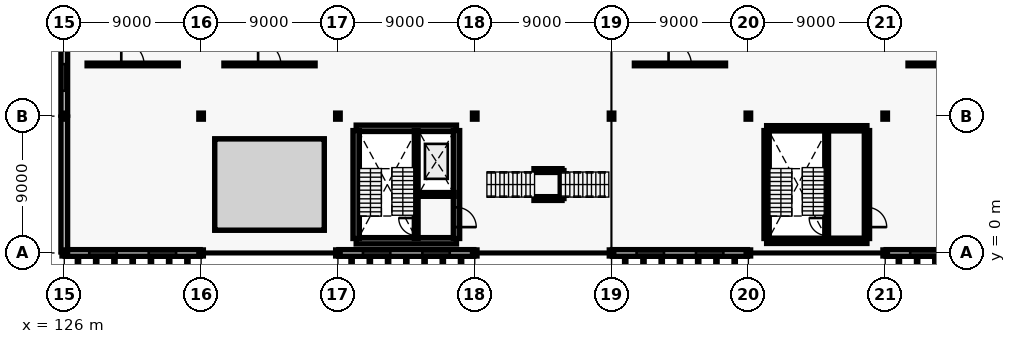
"""IFC4 building model, lengths in metres.
Left out: names, types, materials, properties, quantities, classifications, styles, units other than length and angle.
Written with IfcOpenShell. Run it as: python <this file> out.ifc"""

import sys

from ifc_helpers import new_model, si_unit, direction, frame, frame_2d, origin, origin_2d, place, context, subcontext, project, spatial, rectangle, i_section, extrude, element, fill, save


model = new_model("IFC4")
c1 = context("Model", 3, precision=1e-05, world=origin(), true_north=direction((0.0, 1.0)))
c2 = subcontext(c1, "Body", "Model", "MODEL_VIEW")
j1 = project(units=[si_unit("LENGTHUNIT", "METRE"), si_unit("PLANEANGLEUNIT", "RADIAN")], contexts=[c1])
p1 = place(None, origin())
s1 = spatial("IfcSite", under=j1, at=p1, CompositionType="ELEMENT")
p2 = place(p1, origin())
s2 = spatial("IfcBuilding", under=s1, at=p2, CompositionType="ELEMENT")
p3 = place(p2, frame((0.0, 0.0, 5.4)))
s3 = spatial("IfcBuildingStorey", under=s2, at=p3, CompositionType="ELEMENT", Elevation=5.4)
for number, where, z_axis, x_axis in (
    (1, (126.0, 0.0, 0.0), (0.0, 0.0, 1.0), (1.0, 0.0, 0.0)),
    (2, (126.0, 9.0, 0.0), (0.0, 0.0, 1.0), (1.0, 0.0, 0.0)),
    (3, (135.0, 0.0, 0.0), (0.0, 0.0, 1.0), (1.0, 0.0, 0.0)),
    (4, (135.0, 9.0, 0.0), (0.0, 0.0, 1.0), (1.0, 0.0, 0.0)),
    (5, (144.0, 0.0, 0.0), (0.0, 0.0, 1.0), (1.0, 0.0, 0.0)),
    (6, (144.0, 9.0, 0.0), (0.0, 0.0, 1.0), (1.0, 0.0, 0.0)),
    (7, (153.0, 0.0, 0.0), (0.0, 0.0, 1.0), (1.0, 0.0, 0.0)),
    (8, (153.0, 9.0, 0.0), (0.0, 0.0, 1.0), (1.0, 0.0, 0.0)),
    (9, (162.0, 0.0, 0.0), (0.0, 0.0, 1.0), (1.0, 0.0, 0.0)),
    (10, (162.0, 9.0, 0.0), (0.0, 0.0, 1.0), (1.0, 0.0, 0.0)),
    (11, (171.0, 0.0, 0.0), (0.0, 0.0, 1.0), (1.0, 0.0, 0.0)),
    (12, (171.0, 9.0, 0.0), (0.0, 0.0, 1.0), (1.0, 0.0, 0.0)),
    (13, (180.0, 0.0, 0.0), (0.0, 0.0, 1.0), (1.0, 0.0, 0.0)),
    (14, (180.0, 9.0, 0.0), (0.0, 0.0, 1.0), (1.0, 0.0, 0.0)),
):
    element("IfcColumn", number, at=place(p3, frame(where, z_axis=z_axis, x_axis=x_axis)), inside=s3, PredefinedType="COLUMN", context=c2, shape_type="SweptSolid", body=[
        extrude(i_section(OverallWidth=0.3, OverallDepth=0.4, WebThickness=0.013, FlangeThickness=0.024, FilletRadius=0.027, at=origin_2d()), origin(), (0.0, 0.0, 1.0), 4.2),
    ])
p4 = place(p3, frame((126.06, 0.0, 0.0), z_axis=(0.0, 0.0, 1.0), x_axis=(1.0, 0.0, 0.0)))
e15 = element("IfcWall", 15, at=p4, inside=s3, PredefinedType="SOLIDWALL", context=c2, shape_type="SweptSolid", body=[
    extrude(rectangle(XDim=8.88, YDim=0.44, at=frame_2d((4.44, 0.0))), origin(), (0.0, 0.0, 1.0), 3.5),
])
p5 = place(p4, frame((1.586, 0.0, 0.9)))
e16 = element("IfcOpeningElement", 16, at=p5, cuts=e15, PredefinedType="OPENING", context=c2, shape_type="SweptSolid", body=[
    extrude(rectangle(XDim=1.8, YDim=2.1, at=frame_2d((0.9, 1.05))), frame((0.0, 0.23, 0.0), z_axis=(0.0, -1.0, 0.0), x_axis=(1.0, 0.0, 0.0)), (0.0, 0.0, 1.0), 0.46),
])
p6 = place(p4, frame((5.494, 0.0, 0.9)))
e17 = element("IfcOpeningElement", 17, at=p6, cuts=e15, PredefinedType="OPENING", context=c2, shape_type="SweptSolid", body=[
    extrude(rectangle(XDim=1.8, YDim=2.1, at=frame_2d((0.9, 1.05))), frame((0.0, 0.23, 0.0), z_axis=(0.0, -1.0, 0.0), x_axis=(1.0, 0.0, 0.0)), (0.0, 0.0, 1.0), 0.46),
])
p7 = place(p3, frame((144.06, 0.0, 0.0), z_axis=(0.0, 0.0, 1.0), x_axis=(1.0, 0.0, 0.0)))
e18 = element("IfcWall", 18, at=p7, inside=s3, PredefinedType="SOLIDWALL", context=c2, shape_type="SweptSolid", body=[
    extrude(rectangle(XDim=8.88, YDim=0.44, at=frame_2d((4.44, 0.0))), origin(), (0.0, 0.0, 1.0), 3.5),
])
p8 = place(p7, frame((1.586, 0.0, 0.9)))
e19 = element("IfcOpeningElement", 19, at=p8, cuts=e18, PredefinedType="OPENING", context=c2, shape_type="SweptSolid", body=[
    extrude(rectangle(XDim=1.8, YDim=2.1, at=frame_2d((0.9, 1.05))), frame((0.0, 0.23, 0.0), z_axis=(0.0, -1.0, 0.0), x_axis=(1.0, 0.0, 0.0)), (0.0, 0.0, 1.0), 0.46),
])
p9 = place(p7, frame((5.494, 0.0, 0.9)))
e20 = element("IfcOpeningElement", 20, at=p9, cuts=e18, PredefinedType="OPENING", context=c2, shape_type="SweptSolid", body=[
    extrude(rectangle(XDim=1.8, YDim=2.1, at=frame_2d((0.9, 1.05))), frame((0.0, 0.23, 0.0), z_axis=(0.0, -1.0, 0.0), x_axis=(1.0, 0.0, 0.0)), (0.0, 0.0, 1.0), 0.46),
])
p10 = place(p3, frame((162.06, 0.0, 0.0), z_axis=(0.0, 0.0, 1.0), x_axis=(1.0, 0.0, 0.0)))
e21 = element("IfcWall", 21, at=p10, inside=s3, PredefinedType="SOLIDWALL", context=c2, shape_type="SweptSolid", body=[
    extrude(rectangle(XDim=8.88, YDim=0.44, at=frame_2d((4.44, 0.0))), origin(), (0.0, 0.0, 1.0), 3.5),
])
p11 = place(p10, frame((1.586, 0.0, 0.9)))
e22 = element("IfcOpeningElement", 22, at=p11, cuts=e21, PredefinedType="OPENING", context=c2, shape_type="SweptSolid", body=[
    extrude(rectangle(XDim=1.8, YDim=2.1, at=frame_2d((0.9, 1.05))), frame((0.0, 0.23, 0.0), z_axis=(0.0, -1.0, 0.0), x_axis=(1.0, 0.0, 0.0)), (0.0, 0.0, 1.0), 0.46),
])
p12 = place(p10, frame((5.494, 0.0, 0.9)))
e23 = element("IfcOpeningElement", 23, at=p12, cuts=e21, PredefinedType="OPENING", context=c2, shape_type="SweptSolid", body=[
    extrude(rectangle(XDim=1.8, YDim=2.1, at=frame_2d((0.9, 1.05))), frame((0.0, 0.23, 0.0), z_axis=(0.0, -1.0, 0.0), x_axis=(1.0, 0.0, 0.0)), (0.0, 0.0, 1.0), 0.46),
])
p13 = place(p3, frame((180.06, 0.0, 0.0), z_axis=(0.0, 0.0, 1.0), x_axis=(1.0, 0.0, 0.0)))
e24 = element("IfcWall", 24, at=p13, inside=s3, PredefinedType="SOLIDWALL", context=c2, shape_type="SweptSolid", body=[
    extrude(rectangle(XDim=8.88, YDim=0.44, at=frame_2d((4.44, 0.0))), origin(), (0.0, 0.0, 1.0), 3.5),
])
p14 = place(p13, frame((1.586, 0.0, 0.9)))
e25 = element("IfcOpeningElement", 25, at=p14, cuts=e24, PredefinedType="OPENING", context=c2, shape_type="SweptSolid", body=[
    extrude(rectangle(XDim=1.8, YDim=2.1, at=frame_2d((0.9, 1.05))), frame((0.0, 0.23, 0.0), z_axis=(0.0, -1.0, 0.0), x_axis=(1.0, 0.0, 0.0)), (0.0, 0.0, 1.0), 0.46),
])
p15 = place(p13, frame((5.494, 0.0, 0.9)))
e26 = element("IfcOpeningElement", 26, at=p15, cuts=e24, PredefinedType="OPENING", context=c2, shape_type="SweptSolid", body=[
    extrude(rectangle(XDim=1.8, YDim=2.1, at=frame_2d((0.9, 1.05))), frame((0.0, 0.23, 0.0), z_axis=(0.0, -1.0, 0.0), x_axis=(1.0, 0.0, 0.0)), (0.0, 0.0, 1.0), 0.46),
])
p16 = place(p3, frame((126.0, 0.06, 0.0), z_axis=(0.0, 0.0, 1.0), x_axis=(0.0, 1.0, 0.0)))
e27 = element("IfcWall", 27, at=p16, inside=s3, PredefinedType="SOLIDWALL", context=c2, shape_type="SweptSolid", body=[
    extrude(rectangle(XDim=8.88, YDim=0.44, at=frame_2d((4.44, 0.0))), origin(), (0.0, 0.0, 1.0), 3.5),
])
p17 = place(p3, frame((126.0, 9.06, 0.0), z_axis=(0.0, 0.0, 1.0), x_axis=(0.0, 1.0, 0.0)))
e28 = element("IfcWall", 28, at=p17, inside=s3, PredefinedType="SOLIDWALL", context=c2, shape_type="SweptSolid", body=[
    extrude(rectangle(XDim=8.88, YDim=0.44, at=frame_2d((4.44, 0.0))), origin(), (0.0, 0.0, 1.0), 3.5),
])
p18 = place(p17, frame((1.611, 0.0, 0.9)))
e29 = element("IfcOpeningElement", 29, at=p18, cuts=e28, PredefinedType="OPENING", context=c2, shape_type="SweptSolid", body=[
    extrude(rectangle(XDim=1.75, YDim=2.25, at=frame_2d((0.875, 1.125))), frame((0.0, 0.23, 0.0), z_axis=(0.0, -1.0, 0.0), x_axis=(1.0, 0.0, 0.0)), (0.0, 0.0, 1.0), 0.46),
])
p19 = place(p17, frame((5.519, 0.0, 0.9)))
e30 = element("IfcOpeningElement", 30, at=p19, cuts=e28, PredefinedType="OPENING", context=c2, shape_type="SweptSolid", body=[
    extrude(rectangle(XDim=1.75, YDim=2.25, at=frame_2d((0.875, 1.125))), frame((0.0, 0.23, 0.0), z_axis=(0.0, -1.0, 0.0), x_axis=(1.0, 0.0, 0.0)), (0.0, 0.0, 1.0), 0.46),
])
for number, where, z_axis, x_axis in (
    (31, (145.2, 0.8, 0.0), (0.0, 0.0, 1.0), (1.0, 0.0, 0.0)),
    (32, (145.2, 8.2, 0.0), (0.0, 0.0, 1.0), (1.0, 0.0, 0.0)),
):
    element("IfcWall", number, at=place(p3, frame(where, z_axis=z_axis, x_axis=x_axis)), inside=s3, PredefinedType="SHEAR", context=c2, shape_type="SweptSolid", body=[
        extrude(rectangle(XDim=6.6, YDim=0.42, at=frame_2d((3.3, 0.0))), origin(), (0.0, 0.0, 1.0), 4.2),
    ])
p20 = place(p3, frame((145.2, 0.95, 0.0), z_axis=(0.0, 0.0, 1.0), x_axis=(0.0, 1.0, 0.0)))
e33 = element("IfcWall", 33, at=p20, inside=s3, PredefinedType="SHEAR", context=c2, shape_type="SweptSolid", body=[
    extrude(rectangle(XDim=7.1, YDim=0.42, at=frame_2d((3.55, 0.0))), origin(), (0.0, 0.0, 1.0), 4.2),
])
p21 = place(p3, frame((151.8, 0.95, 0.0), z_axis=(0.0, 0.0, 1.0), x_axis=(0.0, 1.0, 0.0)))
e34 = element("IfcWall", 34, at=p21, inside=s3, PredefinedType="SHEAR", context=c2, shape_type="SweptSolid", body=[
    extrude(rectangle(XDim=7.1, YDim=0.42, at=frame_2d((3.55, 0.0))), origin(), (0.0, 0.0, 1.0), 4.2),
])
p22 = place(p21, frame((0.75, 0.0, 0.0)))
e35 = element("IfcOpeningElement", 35, at=p22, cuts=e34, PredefinedType="OPENING", context=c2, shape_type="SweptSolid", body=[
    extrude(rectangle(XDim=1.3, YDim=2.15, at=frame_2d((0.65, 1.075))), frame((0.0, 0.22, 0.0), z_axis=(0.0, -1.0, 0.0), x_axis=(1.0, 0.0, 0.0)), (0.0, 0.0, 1.0), 0.44),
])
p23 = place(p3, frame((149.15, 0.95, 0.0), z_axis=(0.0, 0.0, 1.0), x_axis=(0.0, 1.0, 0.0)))
e36 = element("IfcWall", 36, at=p23, inside=s3, PredefinedType="SHEAR", context=c2, shape_type="SweptSolid", body=[
    extrude(rectangle(XDim=7.1, YDim=0.25, at=frame_2d((3.55, 0.0))), origin(), (0.0, 0.0, 1.0), 4.2),
])
p24 = place(p23, frame((0.2, 0.0, 0.0)))
e37 = element("IfcOpeningElement", 37, at=p24, cuts=e36, PredefinedType="OPENING", context=c2, shape_type="SweptSolid", body=[
    extrude(rectangle(XDim=1.15, YDim=2.15, at=frame_2d((0.575, 1.075))), frame((0.0, 0.135, 0.0), z_axis=(0.0, -1.0, 0.0), x_axis=(1.0, 0.0, 0.0)), (0.0, 0.0, 1.0), 0.27),
])
p25 = place(p3, frame((149.27, 3.85, 0.0), z_axis=(0.0, 0.0, 1.0), x_axis=(1.0, 0.0, 0.0)))
e38 = element("IfcWall", 38, at=p25, inside=s3, PredefinedType="SHEAR", context=c2, shape_type="SweptSolid", body=[
    extrude(rectangle(XDim=2.38, YDim=0.25, at=frame_2d((1.19, 0.0))), origin(), (0.0, 0.0, 1.0), 4.2),
])
p26 = place(p25, frame((0.64, 0.0, 0.0)))
e39 = element("IfcOpeningElement", 39, at=p26, cuts=e38, PredefinedType="OPENING", context=c2, shape_type="SweptSolid", body=[
    extrude(rectangle(XDim=1.1, YDim=2.15, at=frame_2d((0.55, 1.075))), frame((0.0, 0.135, 0.0), z_axis=(0.0, -1.0, 0.0), x_axis=(1.0, 0.0, 0.0)), (0.0, 0.0, 1.0), 0.27),
])
for number, where, z_axis, x_axis in (
    (40, (172.2, 0.8, 0.0), (0.0, 0.0, 1.0), (1.0, 0.0, 0.0)),
    (41, (172.2, 8.2, 0.0), (0.0, 0.0, 1.0), (1.0, 0.0, 0.0)),
):
    element("IfcWall", number, at=place(p3, frame(where, z_axis=z_axis, x_axis=x_axis)), inside=s3, PredefinedType="SHEAR", context=c2, shape_type="SweptSolid", body=[
        extrude(rectangle(XDim=6.6, YDim=0.35, at=frame_2d((3.3, 0.0))), origin(), (0.0, 0.0, 1.0), 4.2),
    ])
p27 = place(p3, frame((172.2, 0.95, 0.0), z_axis=(0.0, 0.0, 1.0), x_axis=(0.0, 1.0, 0.0)))
e42 = element("IfcWall", 42, at=p27, inside=s3, PredefinedType="SHEAR", context=c2, shape_type="SweptSolid", body=[
    extrude(rectangle(XDim=7.1, YDim=0.35, at=frame_2d((3.55, 0.0))), origin(), (0.0, 0.0, 1.0), 4.2),
])
p28 = place(p3, frame((178.8, 0.95, 0.0), z_axis=(0.0, 0.0, 1.0), x_axis=(0.0, 1.0, 0.0)))
e43 = element("IfcWall", 43, at=p28, inside=s3, PredefinedType="SHEAR", context=c2, shape_type="SweptSolid", body=[
    extrude(rectangle(XDim=7.1, YDim=0.35, at=frame_2d((3.55, 0.0))), origin(), (0.0, 0.0, 1.0), 4.2),
])
p29 = place(p28, frame((0.75, 0.0, 0.0)))
e44 = element("IfcOpeningElement", 44, at=p29, cuts=e43, PredefinedType="OPENING", context=c2, shape_type="SweptSolid", body=[
    extrude(rectangle(XDim=1.3, YDim=2.15, at=frame_2d((0.65, 1.075))), frame((0.0, 0.185, 0.0), z_axis=(0.0, -1.0, 0.0), x_axis=(1.0, 0.0, 0.0)), (0.0, 0.0, 1.0), 0.37),
])
p30 = place(p3, frame((176.15, 0.95, 0.0), z_axis=(0.0, 0.0, 1.0), x_axis=(0.0, 1.0, 0.0)))
e45 = element("IfcWall", 45, at=p30, inside=s3, PredefinedType="SHEAR", context=c2, shape_type="SweptSolid", body=[
    extrude(rectangle(XDim=7.1, YDim=0.25, at=frame_2d((3.55, 0.0))), origin(), (0.0, 0.0, 1.0), 4.2),
])
p31 = place(p30, frame((0.2, 0.0, 0.0)))
e46 = element("IfcOpeningElement", 46, at=p31, cuts=e45, PredefinedType="OPENING", context=c2, shape_type="SweptSolid", body=[
    extrude(rectangle(XDim=1.15, YDim=2.15, at=frame_2d((0.575, 1.075))), frame((0.0, 0.135, 0.0), z_axis=(0.0, -1.0, 0.0), x_axis=(1.0, 0.0, 0.0)), (0.0, 0.0, 1.0), 0.27),
])
for number, where, z_axis, x_axis in (
    (47, (156.895, 3.58, 0.0), (0.0, 0.0, 1.0), (1.0, 0.0, 0.0)),
    (48, (156.895, 5.42, 0.0), (0.0, 0.0, 1.0), (1.0, 0.0, 0.0)),
):
    element("IfcWall", number, at=place(p3, frame(where, z_axis=z_axis, x_axis=x_axis)), inside=s3, PredefinedType="SHEAR", context=c2, shape_type="SweptSolid", body=[
        extrude(rectangle(XDim=1.85, YDim=0.25, at=frame_2d((0.925, 0.0))), origin(), (0.0, 0.0, 1.0), 1.86),
    ])
p32 = place(p3, frame((158.745, 3.58, 0.0), z_axis=(0.0, 0.0, 1.0), x_axis=(0.0, 1.0, 0.0)))
e49 = element("IfcWall", 49, at=p32, inside=s3, PredefinedType="SHEAR", context=c2, shape_type="SweptSolid", body=[
    extrude(rectangle(XDim=1.84, YDim=0.25, at=frame_2d((0.92, 0.0))), origin(), (0.0, 0.0, 1.0), 1.86),
])
p33 = place(p3, frame((127.5, 12.4, 0.0), z_axis=(0.0, 0.0, 1.0), x_axis=(1.0, 0.0, 0.0)))
e50 = element("IfcWall", 50, at=p33, inside=s3, PredefinedType="PARTITIONING", context=c2, shape_type="SweptSolid", body=[
    extrude(rectangle(XDim=6.0, YDim=0.175, at=frame_2d((3.0, 0.0))), origin(), (0.0, 0.0, 1.0), 3.2),
])
p34 = place(p33, frame((2.25, 0.0, 0.0)))
e51 = element("IfcOpeningElement", 51, at=p34, cuts=e50, PredefinedType="OPENING", context=c2, shape_type="SweptSolid", body=[
    extrude(rectangle(XDim=1.5, YDim=2.2, at=frame_2d((0.75, 1.1))), frame((0.0, 0.097, 0.0), z_axis=(0.0, -1.0, 0.0), x_axis=(1.0, 0.0, 0.0)), (0.0, 0.0, 1.0), 0.195),
])
p35 = place(p3, frame((136.5, 12.4, 0.0), z_axis=(0.0, 0.0, 1.0), x_axis=(1.0, 0.0, 0.0)))
e52 = element("IfcWall", 52, at=p35, inside=s3, PredefinedType="PARTITIONING", context=c2, shape_type="SweptSolid", body=[
    extrude(rectangle(XDim=6.0, YDim=0.175, at=frame_2d((3.0, 0.0))), origin(), (0.0, 0.0, 1.0), 3.2),
])
p36 = place(p35, frame((2.25, 0.0, 0.0)))
e53 = element("IfcOpeningElement", 53, at=p36, cuts=e52, PredefinedType="OPENING", context=c2, shape_type="SweptSolid", body=[
    extrude(rectangle(XDim=1.5, YDim=2.2, at=frame_2d((0.75, 1.1))), frame((0.0, 0.097, 0.0), z_axis=(0.0, -1.0, 0.0), x_axis=(1.0, 0.0, 0.0)), (0.0, 0.0, 1.0), 0.195),
])
p37 = place(p3, frame((163.5, 12.4, 0.0), z_axis=(0.0, 0.0, 1.0), x_axis=(1.0, 0.0, 0.0)))
e54 = element("IfcWall", 54, at=p37, inside=s3, PredefinedType="PARTITIONING", context=c2, shape_type="SweptSolid", body=[
    extrude(rectangle(XDim=6.0, YDim=0.175, at=frame_2d((3.0, 0.0))), origin(), (0.0, 0.0, 1.0), 3.2),
])
p38 = place(p37, frame((2.25, 0.0, 0.0)))
e55 = element("IfcOpeningElement", 55, at=p38, cuts=e54, PredefinedType="OPENING", context=c2, shape_type="SweptSolid", body=[
    extrude(rectangle(XDim=1.5, YDim=2.2, at=frame_2d((0.75, 1.1))), frame((0.0, 0.097, 0.0), z_axis=(0.0, -1.0, 0.0), x_axis=(1.0, 0.0, 0.0)), (0.0, 0.0, 1.0), 0.195),
])
p39 = place(p3, frame((181.5, 12.4, 0.0), z_axis=(0.0, 0.0, 1.0), x_axis=(1.0, 0.0, 0.0)))
e56 = element("IfcWall", 56, at=p39, inside=s3, PredefinedType="PARTITIONING", context=c2, shape_type="SweptSolid", body=[
    extrude(rectangle(XDim=6.0, YDim=0.175, at=frame_2d((3.0, 0.0))), origin(), (0.0, 0.0, 1.0), 3.2),
])
p40 = place(p39, frame((2.25, 0.0, 0.0)))
e57 = element("IfcOpeningElement", 57, at=p40, cuts=e56, PredefinedType="OPENING", context=c2, shape_type="SweptSolid", body=[
    extrude(rectangle(XDim=1.5, YDim=2.2, at=frame_2d((0.75, 1.1))), frame((0.0, 0.097, 0.0), z_axis=(0.0, -1.0, 0.0), x_axis=(1.0, 0.0, 0.0)), (0.0, 0.0, 1.0), 0.195),
])
p41 = place(p5, origin())
e58 = element("IfcWindow", 58, at=p41, inside=s3, PartitioningType="SINGLE_PANEL", PredefinedType="WINDOW", context=c2, shape_type="SweptSolid", body=[
    extrude(rectangle(XDim=1.8, YDim=2.1, at=frame_2d((0.9, 1.05))), frame((0.0, 0.03, 0.0), z_axis=(0.0, -1.0, 0.0), x_axis=(1.0, 0.0, 0.0)), (0.0, 0.0, 1.0), 0.06),
])
fill(e16, e58)
p42 = place(p6, origin())
e59 = element("IfcWindow", 59, at=p42, inside=s3, PartitioningType="SINGLE_PANEL", PredefinedType="WINDOW", context=c2, shape_type="SweptSolid", body=[
    extrude(rectangle(XDim=1.8, YDim=2.1, at=frame_2d((0.9, 1.05))), frame((0.0, 0.03, 0.0), z_axis=(0.0, -1.0, 0.0), x_axis=(1.0, 0.0, 0.0)), (0.0, 0.0, 1.0), 0.06),
])
fill(e17, e59)
p43 = place(p8, origin())
e60 = element("IfcWindow", 60, at=p43, inside=s3, PartitioningType="SINGLE_PANEL", PredefinedType="WINDOW", context=c2, shape_type="SweptSolid", body=[
    extrude(rectangle(XDim=1.8, YDim=2.1, at=frame_2d((0.9, 1.05))), frame((0.0, 0.03, 0.0), z_axis=(0.0, -1.0, 0.0), x_axis=(1.0, 0.0, 0.0)), (0.0, 0.0, 1.0), 0.06),
])
fill(e19, e60)
p44 = place(p9, origin())
e61 = element("IfcWindow", 61, at=p44, inside=s3, PartitioningType="SINGLE_PANEL", PredefinedType="WINDOW", context=c2, shape_type="SweptSolid", body=[
    extrude(rectangle(XDim=1.8, YDim=2.1, at=frame_2d((0.9, 1.05))), frame((0.0, 0.03, 0.0), z_axis=(0.0, -1.0, 0.0), x_axis=(1.0, 0.0, 0.0)), (0.0, 0.0, 1.0), 0.06),
])
fill(e20, e61)
p45 = place(p11, origin())
e62 = element("IfcWindow", 62, at=p45, inside=s3, PartitioningType="SINGLE_PANEL", PredefinedType="WINDOW", context=c2, shape_type="SweptSolid", body=[
    extrude(rectangle(XDim=1.8, YDim=2.1, at=frame_2d((0.9, 1.05))), frame((0.0, 0.03, 0.0), z_axis=(0.0, -1.0, 0.0), x_axis=(1.0, 0.0, 0.0)), (0.0, 0.0, 1.0), 0.06),
])
fill(e22, e62)
p46 = place(p12, origin())
e63 = element("IfcWindow", 63, at=p46, inside=s3, PartitioningType="SINGLE_PANEL", PredefinedType="WINDOW", context=c2, shape_type="SweptSolid", body=[
    extrude(rectangle(XDim=1.8, YDim=2.1, at=frame_2d((0.9, 1.05))), frame((0.0, 0.03, 0.0), z_axis=(0.0, -1.0, 0.0), x_axis=(1.0, 0.0, 0.0)), (0.0, 0.0, 1.0), 0.06),
])
fill(e23, e63)
p47 = place(p14, origin())
e64 = element("IfcWindow", 64, at=p47, inside=s3, PartitioningType="SINGLE_PANEL", PredefinedType="WINDOW", context=c2, shape_type="SweptSolid", body=[
    extrude(rectangle(XDim=1.8, YDim=2.1, at=frame_2d((0.9, 1.05))), frame((0.0, 0.03, 0.0), z_axis=(0.0, -1.0, 0.0), x_axis=(1.0, 0.0, 0.0)), (0.0, 0.0, 1.0), 0.06),
])
fill(e25, e64)
p48 = place(p18, origin())
e65 = element("IfcWindow", 65, at=p48, inside=s3, PartitioningType="SINGLE_PANEL", PredefinedType="WINDOW", context=c2, shape_type="SweptSolid", body=[
    extrude(rectangle(XDim=1.75, YDim=2.25, at=frame_2d((0.875, 1.125))), frame((0.0, 0.03, 0.0), z_axis=(0.0, -1.0, 0.0), x_axis=(1.0, 0.0, 0.0)), (0.0, 0.0, 1.0), 0.06),
])
fill(e29, e65)
p49 = place(p22, frame((1.3, 0.0, 0.0), z_axis=(0.0, 0.0, 1.0), x_axis=(-1.0, 0.0, 0.0)))
e66 = element("IfcDoor", 66, at=p49, inside=s3, OperationType="DOUBLE_DOOR_SINGLE_SWING", PredefinedType="DOOR", context=c2, shape_type="SweptSolid", body=[
    extrude(rectangle(XDim=1.3, YDim=2.15, at=frame_2d((0.65, 1.075))), frame((0.0, 0.025, 0.0), z_axis=(0.0, -1.0, 0.0), x_axis=(1.0, 0.0, 0.0)), (0.0, 0.0, 1.0), 0.05),
])
fill(e35, e66)
p50 = place(p24, frame((1.15, 0.0, 0.0), z_axis=(0.0, 0.0, 1.0), x_axis=(-1.0, 0.0, 0.0)))
e67 = element("IfcDoor", 67, at=p50, inside=s3, OperationType="SINGLE_SWING_RIGHT", PredefinedType="DOOR", context=c2, shape_type="SweptSolid", body=[
    extrude(rectangle(XDim=1.15, YDim=2.15, at=frame_2d((0.575, 1.075))), frame((0.0, 0.025, 0.0), z_axis=(0.0, -1.0, 0.0), x_axis=(1.0, 0.0, 0.0)), (0.0, 0.0, 1.0), 0.05),
])
fill(e37, e67)
p51 = place(p26, origin())
e68 = element("IfcDoor", 68, at=p51, inside=s3, OperationType="SLIDING_TO_LEFT", PredefinedType="DOOR", context=c2, shape_type="SweptSolid", body=[
    extrude(rectangle(XDim=1.1, YDim=2.15, at=frame_2d((0.55, 1.075))), frame((0.0, 0.025, 0.0), z_axis=(0.0, -1.0, 0.0), x_axis=(1.0, 0.0, 0.0)), (0.0, 0.0, 1.0), 0.05),
])
fill(e39, e68)
p52 = place(p29, frame((1.3, 0.0, 0.0), z_axis=(0.0, 0.0, 1.0), x_axis=(-1.0, 0.0, 0.0)))
e69 = element("IfcDoor", 69, at=p52, inside=s3, OperationType="DOUBLE_DOOR_SINGLE_SWING", PredefinedType="DOOR", context=c2, shape_type="SweptSolid", body=[
    extrude(rectangle(XDim=1.3, YDim=2.15, at=frame_2d((0.65, 1.075))), frame((0.0, 0.025, 0.0), z_axis=(0.0, -1.0, 0.0), x_axis=(1.0, 0.0, 0.0)), (0.0, 0.0, 1.0), 0.05),
])
fill(e44, e69)
p53 = place(p31, frame((1.15, 0.0, 0.0), z_axis=(0.0, 0.0, 1.0), x_axis=(-1.0, 0.0, 0.0)))
e70 = element("IfcDoor", 70, at=p53, inside=s3, OperationType="SINGLE_SWING_RIGHT", PredefinedType="DOOR", context=c2, shape_type="SweptSolid", body=[
    extrude(rectangle(XDim=1.15, YDim=2.15, at=frame_2d((0.575, 1.075))), frame((0.0, 0.025, 0.0), z_axis=(0.0, -1.0, 0.0), x_axis=(1.0, 0.0, 0.0)), (0.0, 0.0, 1.0), 0.05),
])
fill(e46, e70)
p54 = place(p34, origin())
e71 = element("IfcDoor", 71, at=p54, inside=s3, OperationType="DOUBLE_DOOR_SINGLE_SWING", PredefinedType="DOOR", context=c2, shape_type="SweptSolid", body=[
    extrude(rectangle(XDim=1.5, YDim=2.2, at=frame_2d((0.75, 1.1))), frame((0.0, 0.025, 0.0), z_axis=(0.0, -1.0, 0.0), x_axis=(1.0, 0.0, 0.0)), (0.0, 0.0, 1.0), 0.05),
])
fill(e51, e71)
p55 = place(p36, origin())
e72 = element("IfcDoor", 72, at=p55, inside=s3, OperationType="DOUBLE_DOOR_SINGLE_SWING", PredefinedType="DOOR", context=c2, shape_type="SweptSolid", body=[
    extrude(rectangle(XDim=1.5, YDim=2.2, at=frame_2d((0.75, 1.1))), frame((0.0, 0.025, 0.0), z_axis=(0.0, -1.0, 0.0), x_axis=(1.0, 0.0, 0.0)), (0.0, 0.0, 1.0), 0.05),
])
fill(e53, e72)
p56 = place(p38, origin())
e73 = element("IfcDoor", 73, at=p56, inside=s3, OperationType="DOUBLE_DOOR_SINGLE_SWING", PredefinedType="DOOR", context=c2, shape_type="SweptSolid", body=[
    extrude(rectangle(XDim=1.5, YDim=2.2, at=frame_2d((0.75, 1.1))), frame((0.0, 0.025, 0.0), z_axis=(0.0, -1.0, 0.0), x_axis=(1.0, 0.0, 0.0)), (0.0, 0.0, 1.0), 0.05),
])
fill(e55, e73)
save(model, sys.argv[1])
